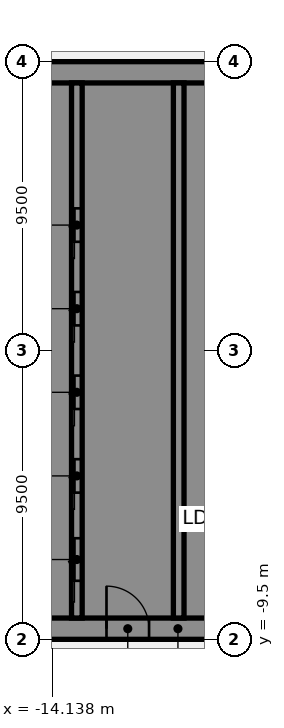
"""IFC4 building model, lengths in metres.
Left out: names, types, materials, properties, quantities, classifications, styles, units other than length and angle.
Written with IfcOpenShell. Run it as: python <this file> out.ifc"""

import sys

from ifc_helpers import new_model, si_unit, direction, frame, frame_2d, origin, place, context, subcontext, project, spatial, polyline, rectangle, outline, extrude, element, fill, save


model = new_model("IFC4")
c1 = context("Model", 3, precision=1e-05, world=origin(), true_north=direction((0.0, 1.0)))
c2 = subcontext(c1, "Body", "Model", "MODEL_VIEW")
j1 = project(units=[si_unit("LENGTHUNIT", "METRE"), si_unit("PLANEANGLEUNIT", "RADIAN")], contexts=[c1])
p1 = place(None, origin())
s1 = spatial("IfcSite", under=j1, at=p1, CompositionType="ELEMENT")
p2 = place(p1, origin())
s2 = spatial("IfcBuilding", under=s1, at=p2, CompositionType="ELEMENT")
p3 = place(p2, frame((0.0, 0.0, 9.0)))
s3 = spatial("IfcBuildingStorey", under=s2, at=p3, CompositionType="ELEMENT", Elevation=9.0)
p4 = place(p3, frame((-16.5, -9.15, 0.0), z_axis=(0.0, 0.0, 1.0), x_axis=(1.0, 0.0, 0.0)))
e1 = element("IfcWall", 1, at=p4, inside=s3, PredefinedType="SHEAR", context=c2, shape_type="SweptSolid", body=[
    extrude(rectangle(XDim=13.0, YDim=0.7, at=frame_2d((6.5, 0.0))), origin(), (0.0, 0.0, 1.0), 5.5),
])
p5 = place(p4, frame((4.15, 0.0, 0.0)))
e2 = element("IfcOpeningElement", 2, at=p5, cuts=e1, PredefinedType="OPENING", context=c2, shape_type="SweptSolid", body=[
    extrude(rectangle(XDim=1.4, YDim=2.1, at=frame_2d((0.7, 1.05))), frame((0.0, 0.36, 0.0), z_axis=(0.0, -1.0, 0.0), x_axis=(1.0, 0.0, 0.0)), (0.0, 0.0, 1.0), 0.72),
])
p6 = place(p4, frame((10.125, 0.0, 0.0)))
e3 = element("IfcOpeningElement", 3, at=p6, cuts=e1, PredefinedType="OPENING", context=c2, shape_type="SweptSolid", body=[
    extrude(rectangle(XDim=1.4, YDim=2.1, at=frame_2d((0.7, 1.05))), frame((0.0, 0.36, 0.0), z_axis=(0.0, -1.0, 0.0), x_axis=(1.0, 0.0, 0.0)), (0.0, 0.0, 1.0), 0.72),
])
p7 = place(p3, origin())
e4 = element("IfcWall", 4, at=p7, inside=s3, PredefinedType="SHEAR", context=c2, shape_type="SweptSolid", body=[
    extrude(outline(polyline([(-13.5, -8.8), (-13.5, -8.125), (-15.8, -8.125), (-15.8, -5.625), (-13.5, -5.625), (-13.5, -5.375), (-15.8, -5.375), (-15.8, -2.875), (-13.5, -2.875), (-13.5, -2.625), (-15.8, -2.625), (-15.8, -0.125), (-13.5, -0.125), (-13.5, 0.125), (-15.8, 0.125), (-15.8, 2.625), (-13.5, 2.625), (-13.5, 2.875), (-15.8, 2.875), (-15.8, 5.375), (-13.5, 5.375), (-13.5, 5.625), (-15.8, 5.625), (-15.8, 8.125), (-13.5, 8.125), (-13.5, 8.8), (-15.8, 8.8), (-16.5, 8.8), (-16.5, -8.8), (-15.8, -8.8), (-13.5, -8.8)])), origin(), (0.0, 0.0, 1.0), 5.5),
])
p8 = place(p3, frame((-16.5, 9.15, 0.0), z_axis=(0.0, 0.0, 1.0), x_axis=(1.0, 0.0, 0.0)))
e5 = element("IfcWall", 5, at=p8, inside=s3, PredefinedType="SHEAR", context=c2, shape_type="SweptSolid", body=[
    extrude(rectangle(XDim=13.0, YDim=0.7, at=frame_2d((6.5, 0.0))), origin(), (0.0, 0.0, 1.0), 5.5),
])
p9 = place(p3, origin())
e6 = element("IfcWall", 6, at=p9, inside=s3, PredefinedType="SHEAR", context=c2, shape_type="SweptSolid", body=[
    extrude(outline(polyline([(-9.8, -5.375), (-9.8, -5.625), (-7.5, -5.625), (-7.15, -5.625), (-7.15, 8.8), (-7.5, 8.8), (-9.8, 8.8), (-9.8, 8.125), (-7.5, 8.125), (-7.5, 5.625), (-9.8, 5.625), (-9.8, 5.375), (-7.5, 5.375), (-7.5, 2.875), (-9.8, 2.875), (-9.8, 2.625), (-7.5, 2.625), (-7.5, 0.125), (-9.8, 0.125), (-9.8, -0.125), (-7.5, -0.125), (-7.5, -2.625), (-9.8, -2.625), (-9.8, -2.875), (-7.5, -2.875), (-7.5, -5.375), (-9.8, -5.375)])), origin(), (0.0, 0.0, 1.0), 5.5),
])
p10 = place(p3, origin())
e7 = element("IfcWall", 7, at=p10, inside=s3, PredefinedType="SHEAR", context=c2, shape_type="SweptSolid", body=[
    extrude(outline(polyline([(-7.5, -8.125), (-9.55, -8.125), (-9.55, -5.625), (-9.8, -5.625), (-9.8, -8.125), (-9.8, -8.8), (-7.5, -8.8), (-7.5, -8.125)])), origin(), (0.0, 0.0, 1.0), 5.5),
])
p11 = place(p3, frame((-13.325, -8.8, 0.0), z_axis=(0.0, 0.0, 1.0), x_axis=(0.0, 1.0, 0.0)))
e8 = element("IfcWall", 8, at=p11, inside=s3, PredefinedType="SHEAR", context=c2, shape_type="SweptSolid", body=[
    extrude(rectangle(XDim=17.6, YDim=0.35, at=frame_2d((8.8, 0.0))), origin(), (0.0, 0.0, 1.0), 5.5),
])
p12 = place(p11, frame((1.225, 0.0, 0.0)))
e9 = element("IfcOpeningElement", 9, at=p12, cuts=e8, PredefinedType="OPENING", context=c2, shape_type="SweptSolid", body=[
    extrude(rectangle(XDim=1.4, YDim=2.1, at=frame_2d((0.7, 1.05))), frame((0.0, 0.185, 0.0), z_axis=(0.0, -1.0, 0.0), x_axis=(1.0, 0.0, 0.0)), (0.0, 0.0, 1.0), 0.37),
])
p13 = place(p11, frame((4.125, 0.0, 0.0)))
e10 = element("IfcOpeningElement", 10, at=p13, cuts=e8, PredefinedType="OPENING", context=c2, shape_type="SweptSolid", body=[
    extrude(rectangle(XDim=1.1, YDim=2.1, at=frame_2d((0.55, 1.05))), frame((0.0, 0.185, 0.0), z_axis=(0.0, -1.0, 0.0), x_axis=(1.0, 0.0, 0.0)), (0.0, 0.0, 1.0), 0.37),
])
p14 = place(p11, frame((6.875, 0.0, 0.0)))
e11 = element("IfcOpeningElement", 11, at=p14, cuts=e8, PredefinedType="OPENING", context=c2, shape_type="SweptSolid", body=[
    extrude(rectangle(XDim=1.1, YDim=2.1, at=frame_2d((0.55, 1.05))), frame((0.0, 0.185, 0.0), z_axis=(0.0, -1.0, 0.0), x_axis=(1.0, 0.0, 0.0)), (0.0, 0.0, 1.0), 0.37),
])
p15 = place(p11, frame((9.625, 0.0, 0.0)))
e12 = element("IfcOpeningElement", 12, at=p15, cuts=e8, PredefinedType="OPENING", context=c2, shape_type="SweptSolid", body=[
    extrude(rectangle(XDim=1.1, YDim=2.1, at=frame_2d((0.55, 1.05))), frame((0.0, 0.185, 0.0), z_axis=(0.0, -1.0, 0.0), x_axis=(1.0, 0.0, 0.0)), (0.0, 0.0, 1.0), 0.37),
])
p16 = place(p11, frame((12.375, 0.0, 0.0)))
e13 = element("IfcOpeningElement", 13, at=p16, cuts=e8, PredefinedType="OPENING", context=c2, shape_type="SweptSolid", body=[
    extrude(rectangle(XDim=1.1, YDim=2.1, at=frame_2d((0.55, 1.05))), frame((0.0, 0.185, 0.0), z_axis=(0.0, -1.0, 0.0), x_axis=(1.0, 0.0, 0.0)), (0.0, 0.0, 1.0), 0.37),
])
p17 = place(p3, frame((-9.975, -8.8, 0.0), z_axis=(0.0, 0.0, 1.0), x_axis=(0.0, 1.0, 0.0)))
e14 = element("IfcWall", 14, at=p17, inside=s3, PredefinedType="SHEAR", context=c2, shape_type="SweptSolid", body=[
    extrude(rectangle(XDim=17.6, YDim=0.35, at=frame_2d((8.8, 0.0))), origin(), (0.0, 0.0, 1.0), 5.5),
])
p18 = place(p5, origin())
e15 = element("IfcDoor", 15, at=p18, inside=s3, OperationType="SINGLE_SWING_LEFT", PredefinedType="DOOR", context=c2, shape_type="SweptSolid", body=[
    extrude(rectangle(XDim=1.4, YDim=2.1, at=frame_2d((0.7, 1.05))), frame((0.0, 0.025, 0.0), z_axis=(0.0, -1.0, 0.0), x_axis=(1.0, 0.0, 0.0)), (0.0, 0.0, 1.0), 0.05),
])
fill(e2, e15)
p19 = place(p12, origin())
e16 = element("IfcDoor", 16, at=p19, inside=s3, OperationType="SLIDING_TO_LEFT", PredefinedType="DOOR", context=c2, shape_type="SweptSolid", body=[
    extrude(rectangle(XDim=1.4, YDim=2.1, at=frame_2d((0.7, 1.05))), frame((0.0, 0.025, 0.0), z_axis=(0.0, -1.0, 0.0), x_axis=(1.0, 0.0, 0.0)), (0.0, 0.0, 1.0), 0.05),
])
fill(e9, e16)
p20 = place(p13, origin())
e17 = element("IfcDoor", 17, at=p20, inside=s3, OperationType="SLIDING_TO_LEFT", PredefinedType="DOOR", context=c2, shape_type="SweptSolid", body=[
    extrude(rectangle(XDim=1.1, YDim=2.1, at=frame_2d((0.55, 1.05))), frame((0.0, 0.025, 0.0), z_axis=(0.0, -1.0, 0.0), x_axis=(1.0, 0.0, 0.0)), (0.0, 0.0, 1.0), 0.05),
])
fill(e10, e17)
p21 = place(p14, origin())
e18 = element("IfcDoor", 18, at=p21, inside=s3, OperationType="SLIDING_TO_LEFT", PredefinedType="DOOR", context=c2, shape_type="SweptSolid", body=[
    extrude(rectangle(XDim=1.1, YDim=2.1, at=frame_2d((0.55, 1.05))), frame((0.0, 0.025, 0.0), z_axis=(0.0, -1.0, 0.0), x_axis=(1.0, 0.0, 0.0)), (0.0, 0.0, 1.0), 0.05),
])
fill(e11, e18)
p22 = place(p15, origin())
e19 = element("IfcDoor", 19, at=p22, inside=s3, OperationType="SLIDING_TO_LEFT", PredefinedType="DOOR", context=c2, shape_type="SweptSolid", body=[
    extrude(rectangle(XDim=1.1, YDim=2.1, at=frame_2d((0.55, 1.05))), frame((0.0, 0.025, 0.0), z_axis=(0.0, -1.0, 0.0), x_axis=(1.0, 0.0, 0.0)), (0.0, 0.0, 1.0), 0.05),
])
fill(e12, e19)
p23 = place(p16, origin())
e20 = element("IfcDoor", 20, at=p23, inside=s3, OperationType="SLIDING_TO_LEFT", PredefinedType="DOOR", context=c2, shape_type="SweptSolid", body=[
    extrude(rectangle(XDim=1.1, YDim=2.1, at=frame_2d((0.55, 1.05))), frame((0.0, 0.025, 0.0), z_axis=(0.0, -1.0, 0.0), x_axis=(1.0, 0.0, 0.0)), (0.0, 0.0, 1.0), 0.05),
])
fill(e13, e20)
save(model, sys.argv[1])
